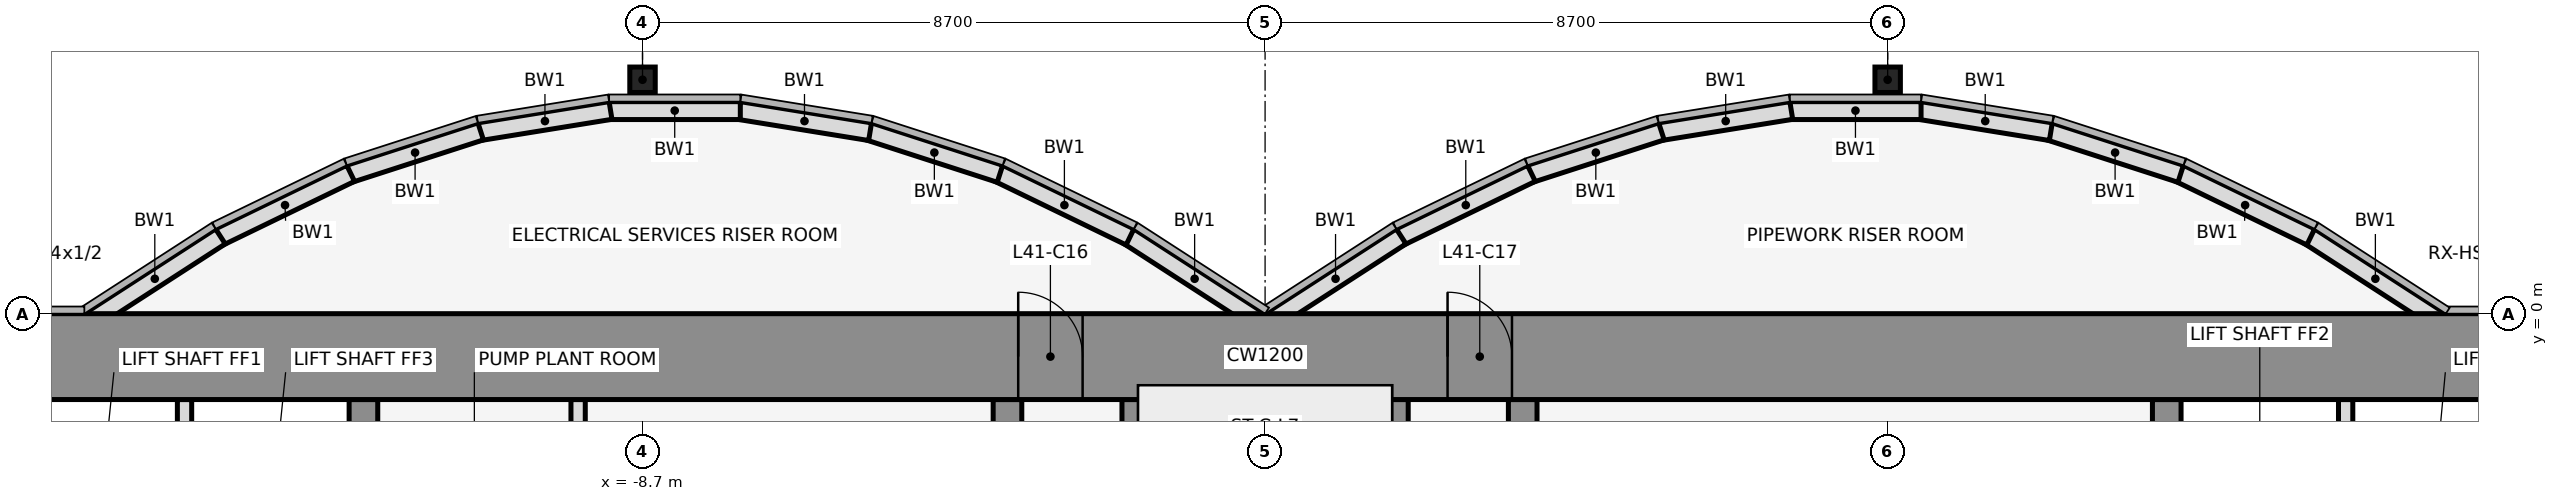
"""IFC4 building model, lengths in metres.
Left out: names, types, materials, properties, quantities, classifications, styles, units other than length and angle.
Written with IfcOpenShell. Run it as: python <this file> out.ifc"""

import sys

from ifc_helpers import new_model, si_unit, direction, frame, frame_2d, origin, origin_2d, place, context, subcontext, project, spatial, rectangle, hollow_rectangle, extrude, element, fill, save


model = new_model("IFC4")
c1 = context("Model", 3, precision=1e-05, world=origin(), true_north=direction((0.0, 1.0)))
c2 = subcontext(c1, "Body", "Model", "MODEL_VIEW")
j1 = project(units=[si_unit("LENGTHUNIT", "METRE"), si_unit("PLANEANGLEUNIT", "RADIAN")], contexts=[c1])
p1 = place(None, origin())
s1 = spatial("IfcSite", under=j1, at=p1, CompositionType="ELEMENT")
p2 = place(p1, origin())
s2 = spatial("IfcBuilding", under=s1, at=p2, CompositionType="ELEMENT")
p3 = place(p2, frame((0.0, 0.0, 185.5)))
s3 = spatial("IfcBuildingStorey", under=s2, at=p3, CompositionType="ELEMENT", Elevation=185.5)
for number, where, z_axis, x_axis in (
    (1, (-8.7, 3.269, 0.0), (0.0, 0.0, 1.0), (1.0, 0.0, 0.0)),
    (2, (8.7, 3.269, 0.0), (0.0, 0.0, 1.0), (1.0, 0.0, 0.0)),
):
    element("IfcColumn", number, at=place(p3, frame(where, z_axis=z_axis, x_axis=x_axis)), inside=s3, PredefinedType="COLUMN", context=c2, shape_type="SweptSolid", body=[
        extrude(hollow_rectangle(XDim=0.356, YDim=0.356, WallThickness=0.012, at=origin_2d()), origin(), (0.0, 0.0, 1.0), 5.4),
    ])
p4 = place(p3, frame((16.432, -0.105, 0.0), z_axis=(0.0, 0.0, 1.0), x_axis=(-0.83981312244, 0.542875602121, 0.0)))
e3 = element("IfcWall", 3, at=p4, inside=s3, PredefinedType="STANDARD", context=c2, shape_type="SweptSolid", body=[
    extrude(rectangle(XDim=2.183, YDim=0.25, at=frame_2d((1.091, 0.0))), origin(), (0.0, 0.0, 1.0), 5.25),
])
p5 = place(p3, frame((14.612, 1.073, 0.0), z_axis=(0.0, 0.0, 1.0), x_axis=(-0.89982408427, 0.436252928206, 0.0)))
e4 = element("IfcWall", 4, at=p5, inside=s3, PredefinedType="STANDARD", context=c2, shape_type="SweptSolid", body=[
    extrude(rectangle(XDim=2.038, YDim=0.25, at=frame_2d((1.019, 0.0))), origin(), (0.0, 0.0, 1.0), 5.25),
])
p6 = place(p3, frame((12.795, 1.955, 0.0), z_axis=(0.0, 0.0, 1.0), x_axis=(-0.951495806175, 0.307661714928, 0.0)))
e5 = element("IfcWall", 5, at=p6, inside=s3, PredefinedType="STANDARD", context=c2, shape_type="SweptSolid", body=[
    extrude(rectangle(XDim=1.927, YDim=0.25, at=frame_2d((0.963, 0.0))), origin(), (0.0, 0.0, 1.0), 5.25),
])
p7 = place(p3, frame((10.98, 2.543, 0.0), z_axis=(0.0, 0.0, 1.0), x_axis=(-0.987181718931, 0.159600293885, 0.0)))
e6 = element("IfcWall", 6, at=p7, inside=s3, PredefinedType="STANDARD", context=c2, shape_type="SweptSolid", body=[
    extrude(rectangle(XDim=1.857, YDim=0.25, at=frame_2d((0.929, 0.0))), origin(), (0.0, 0.0, 1.0), 5.25),
])
p8 = place(p3, frame((9.167, 2.838, 0.0), z_axis=(0.0, 0.0, 1.0), x_axis=(-1.0, 0.0, 0.0)))
e7 = element("IfcWall", 7, at=p8, inside=s3, PredefinedType="STANDARD", context=c2, shape_type="SweptSolid", body=[
    extrude(rectangle(XDim=1.833, YDim=0.25, at=frame_2d((0.917, 0.0))), origin(), (0.0, 0.0, 1.0), 5.25),
])
p9 = place(p3, frame((7.353, 2.84, 0.0), z_axis=(0.0, 0.0, 1.0), x_axis=(-0.987181718931, -0.159600293885, 0.0)))
e8 = element("IfcWall", 8, at=p9, inside=s3, PredefinedType="STANDARD", context=c2, shape_type="SweptSolid", body=[
    extrude(rectangle(XDim=1.857, YDim=0.25, at=frame_2d((0.929, 0.0))), origin(), (0.0, 0.0, 1.0), 5.25),
])
p10 = place(p3, frame((5.538, 2.548, 0.0), z_axis=(0.0, 0.0, 1.0), x_axis=(-0.951495806175, -0.307661714928, 0.0)))
e9 = element("IfcWall", 9, at=p10, inside=s3, PredefinedType="STANDARD", context=c2, shape_type="SweptSolid", body=[
    extrude(rectangle(XDim=1.927, YDim=0.25, at=frame_2d((0.963, 0.0))), origin(), (0.0, 0.0, 1.0), 5.25),
])
p11 = place(p3, frame((3.721, 1.962, 0.0), z_axis=(0.0, 0.0, 1.0), x_axis=(-0.89982408427, -0.436252928206, 0.0)))
e10 = element("IfcWall", 10, at=p11, inside=s3, PredefinedType="STANDARD", context=c2, shape_type="SweptSolid", body=[
    extrude(rectangle(XDim=2.038, YDim=0.25, at=frame_2d((1.019, 0.0))), origin(), (0.0, 0.0, 1.0), 5.25),
])
for number, where, z_axis, x_axis in (
    (11, (1.901, 1.08, 0.0), (0.0, 0.0, 1.0), (-0.84, -0.543, 0.0)),
    (12, (-0.068, -0.105, 0.0), (0.0, 0.0, 1.0), (-0.84, 0.543, 0.0)),
):
    element("IfcWall", number, at=place(p3, frame(where, z_axis=z_axis, x_axis=x_axis)), inside=s3, PredefinedType="STANDARD", context=c2, shape_type="SweptSolid", body=[
        extrude(rectangle(XDim=2.183, YDim=0.25, at=frame_2d((1.091, 0.0))), origin(), (0.0, 0.0, 1.0), 5.25),
    ])
p12 = place(p3, frame((-1.888, 1.073, 0.0), z_axis=(0.0, 0.0, 1.0), x_axis=(-0.89982408427, 0.436252928206, 0.0)))
e13 = element("IfcWall", 13, at=p12, inside=s3, PredefinedType="STANDARD", context=c2, shape_type="SweptSolid", body=[
    extrude(rectangle(XDim=2.038, YDim=0.25, at=frame_2d((1.019, 0.0))), origin(), (0.0, 0.0, 1.0), 5.25),
])
p13 = place(p3, frame((-3.705, 1.955, 0.0), z_axis=(0.0, 0.0, 1.0), x_axis=(-0.951495806175, 0.307661714928, 0.0)))
e14 = element("IfcWall", 14, at=p13, inside=s3, PredefinedType="STANDARD", context=c2, shape_type="SweptSolid", body=[
    extrude(rectangle(XDim=1.927, YDim=0.25, at=frame_2d((0.963, 0.0))), origin(), (0.0, 0.0, 1.0), 5.25),
])
p14 = place(p3, frame((-5.52, 2.543, 0.0), z_axis=(0.0, 0.0, 1.0), x_axis=(-0.987181718931, 0.159600293885, 0.0)))
e15 = element("IfcWall", 15, at=p14, inside=s3, PredefinedType="STANDARD", context=c2, shape_type="SweptSolid", body=[
    extrude(rectangle(XDim=1.857, YDim=0.25, at=frame_2d((0.929, 0.0))), origin(), (0.0, 0.0, 1.0), 5.25),
])
p15 = place(p3, frame((-7.333, 2.838, 0.0), z_axis=(0.0, 0.0, 1.0), x_axis=(-1.0, 0.0, 0.0)))
e16 = element("IfcWall", 16, at=p15, inside=s3, PredefinedType="STANDARD", context=c2, shape_type="SweptSolid", body=[
    extrude(rectangle(XDim=1.833, YDim=0.25, at=frame_2d((0.917, 0.0))), origin(), (0.0, 0.0, 1.0), 5.25),
])
p16 = place(p3, frame((-9.147, 2.84, 0.0), z_axis=(0.0, 0.0, 1.0), x_axis=(-0.987181718931, -0.159600293885, 0.0)))
e17 = element("IfcWall", 17, at=p16, inside=s3, PredefinedType="STANDARD", context=c2, shape_type="SweptSolid", body=[
    extrude(rectangle(XDim=1.857, YDim=0.25, at=frame_2d((0.929, 0.0))), origin(), (0.0, 0.0, 1.0), 5.25),
])
p17 = place(p3, frame((-10.962, 2.548, 0.0), z_axis=(0.0, 0.0, 1.0), x_axis=(-0.951495806175, -0.307661714928, 0.0)))
e18 = element("IfcWall", 18, at=p17, inside=s3, PredefinedType="STANDARD", context=c2, shape_type="SweptSolid", body=[
    extrude(rectangle(XDim=1.927, YDim=0.25, at=frame_2d((0.963, 0.0))), origin(), (0.0, 0.0, 1.0), 5.25),
])
p18 = place(p3, frame((-12.779, 1.962, 0.0), z_axis=(0.0, 0.0, 1.0), x_axis=(-0.89982408427, -0.436252928206, 0.0)))
e19 = element("IfcWall", 19, at=p18, inside=s3, PredefinedType="STANDARD", context=c2, shape_type="SweptSolid", body=[
    extrude(rectangle(XDim=2.038, YDim=0.25, at=frame_2d((1.019, 0.0))), origin(), (0.0, 0.0, 1.0), 5.25),
])
p19 = place(p3, frame((-14.599, 1.08, 0.0), z_axis=(0.0, 0.0, 1.0), x_axis=(-0.83981312244, -0.542875602121, 0.0)))
e20 = element("IfcWall", 20, at=p19, inside=s3, PredefinedType="STANDARD", context=c2, shape_type="SweptSolid", body=[
    extrude(rectangle(XDim=2.183, YDim=0.25, at=frame_2d((1.091, 0.0))), origin(), (0.0, 0.0, 1.0), 5.25),
])
p20 = place(p3, frame((-15.1, -4.6, 0.0), z_axis=(0.0, 0.0, 1.0), x_axis=(0.0, 1.0, 0.0)))
e21 = element("IfcWall", 21, at=p20, inside=s3, PredefinedType="PARTITIONING", context=c2, shape_type="SweptSolid", body=[
    extrude(rectangle(XDim=3.4, YDim=0.2, at=frame_2d((1.7, 0.0))), origin(), (0.0, 0.0, 1.0), 4.26),
])
p21 = place(p3, frame((-12.6, -11.8, 0.0), z_axis=(0.0, 0.0, 1.0), x_axis=(0.0, 1.0, 0.0)))
e22 = element("IfcWall", 22, at=p21, inside=s3, PredefinedType="SHEAR", context=c2, shape_type="SweptSolid", body=[
    extrude(rectangle(XDim=10.6, YDim=0.4, at=frame_2d((5.3, 0.0))), origin(), (0.0, 0.0, 1.0), 5.4),
])
p22 = place(p21, frame((4.75, 0.0, 0.0)))
e23 = element("IfcOpeningElement", 23, at=p22, cuts=e22, PredefinedType="OPENING", context=c2, shape_type="SweptSolid", body=[
    extrude(rectangle(XDim=1.1, YDim=2.1, at=frame_2d((0.55, 1.05))), frame((0.0, 0.212, 0.0), z_axis=(0.0, -1.0, 0.0), x_axis=(1.0, 0.0, 0.0)), (0.0, 0.0, 1.0), 0.424),
])
p23 = place(p3, frame((-9.6, -4.6, 0.0), z_axis=(0.0, 0.0, 1.0), x_axis=(0.0, 1.0, 0.0)))
e24 = element("IfcWall", 24, at=p23, inside=s3, PredefinedType="PARTITIONING", context=c2, shape_type="SweptSolid", body=[
    extrude(rectangle(XDim=3.4, YDim=0.2, at=frame_2d((1.7, 0.0))), origin(), (0.0, 0.0, 1.0), 4.26),
])
p24 = place(p3, frame((-3.6, -11.8, 0.0), z_axis=(0.0, 0.0, 1.0), x_axis=(0.0, 1.0, 0.0)))
e25 = element("IfcWall", 25, at=p24, inside=s3, PredefinedType="SHEAR", context=c2, shape_type="SweptSolid", body=[
    extrude(rectangle(XDim=10.6, YDim=0.4, at=frame_2d((5.3, 0.0))), origin(), (0.0, 0.0, 1.0), 5.4),
])
p25 = place(p24, frame((4.85, 0.0, 0.0)))
e26 = element("IfcOpeningElement", 26, at=p25, cuts=e25, PredefinedType="OPENING", context=c2, shape_type="SweptSolid", body=[
    extrude(rectangle(XDim=0.9, YDim=2.1, at=frame_2d((0.45, 1.05))), frame((0.0, 0.212, 0.0), z_axis=(0.0, -1.0, 0.0), x_axis=(1.0, 0.0, 0.0)), (0.0, 0.0, 1.0), 0.424),
])
for number, where, z_axis, x_axis in (
    (27, (-1.8, -11.8, 0.0), (0.0, 0.0, 1.0), (0.0, 1.0, 0.0)),
    (28, (1.8, -11.8, 0.0), (0.0, 0.0, 1.0), (0.0, 1.0, 0.0)),
):
    element("IfcWall", number, at=place(p3, frame(where, z_axis=z_axis, x_axis=x_axis)), inside=s3, PredefinedType="SHEAR", context=c2, shape_type="SweptSolid", body=[
        extrude(rectangle(XDim=10.6, YDim=0.4, at=frame_2d((5.3, 0.0))), origin(), (0.0, 0.0, 1.0), 5.4),
    ])
p26 = place(p3, frame((3.6, -11.8, 0.0), z_axis=(0.0, 0.0, 1.0), x_axis=(0.0, 1.0, 0.0)))
e29 = element("IfcWall", 29, at=p26, inside=s3, PredefinedType="SHEAR", context=c2, shape_type="SweptSolid", body=[
    extrude(rectangle(XDim=10.6, YDim=0.4, at=frame_2d((5.3, 0.0))), origin(), (0.0, 0.0, 1.0), 5.4),
])
p27 = place(p26, frame((1.35, 0.0, 0.0)))
e30 = element("IfcOpeningElement", 30, at=p27, cuts=e29, PredefinedType="OPENING", context=c2, shape_type="SweptSolid", body=[
    extrude(rectangle(XDim=0.9, YDim=2.1, at=frame_2d((0.45, 1.05))), frame((0.0, 0.212, 0.0), z_axis=(0.0, -1.0, 0.0), x_axis=(1.0, 0.0, 0.0)), (0.0, 0.0, 1.0), 0.424),
])
p28 = place(p3, frame((12.6, -11.8, 0.0), z_axis=(0.0, 0.0, 1.0), x_axis=(0.0, 1.0, 0.0)))
e31 = element("IfcWall", 31, at=p28, inside=s3, PredefinedType="SHEAR", context=c2, shape_type="SweptSolid", body=[
    extrude(rectangle(XDim=10.6, YDim=0.4, at=frame_2d((5.3, 0.0))), origin(), (0.0, 0.0, 1.0), 5.4),
])
p29 = place(p28, frame((1.25, 0.0, 0.0)))
e32 = element("IfcOpeningElement", 32, at=p29, cuts=e31, PredefinedType="OPENING", context=c2, shape_type="SweptSolid", body=[
    extrude(rectangle(XDim=1.2, YDim=2.1, at=frame_2d((0.6, 1.05))), frame((0.0, 0.212, 0.0), z_axis=(0.0, -1.0, 0.0), x_axis=(1.0, 0.0, 0.0)), (0.0, 0.0, 1.0), 0.424),
])
p30 = place(p28, frame((4.75, 0.0, 0.0)))
e33 = element("IfcOpeningElement", 33, at=p30, cuts=e31, PredefinedType="OPENING", context=c2, shape_type="SweptSolid", body=[
    extrude(rectangle(XDim=1.1, YDim=2.1, at=frame_2d((0.55, 1.05))), frame((0.0, 0.212, 0.0), z_axis=(0.0, -1.0, 0.0), x_axis=(1.0, 0.0, 0.0)), (0.0, 0.0, 1.0), 0.424),
])
p31 = place(p3, frame((15.1, -4.6, 0.0), z_axis=(0.0, 0.0, 1.0), x_axis=(0.0, 1.0, 0.0)))
e34 = element("IfcWall", 34, at=p31, inside=s3, PredefinedType="PARTITIONING", context=c2, shape_type="SweptSolid", body=[
    extrude(rectangle(XDim=3.4, YDim=0.2, at=frame_2d((1.7, 0.0))), origin(), (0.0, 0.0, 1.0), 4.26),
])
p32 = place(p3, frame((-22.0, -0.6, 0.0), z_axis=(0.0, 0.0, 1.0), x_axis=(1.0, 0.0, 0.0)))
e35 = element("IfcWall", 35, at=p32, inside=s3, PredefinedType="SHEAR", context=c2, shape_type="SweptSolid", body=[
    extrude(rectangle(XDim=44.0, YDim=1.2, at=frame_2d((22.0, 0.0))), origin(), (0.0, 0.0, 1.0), 5.4),
])
p33 = place(p32, frame((18.55, 0.0, 0.0)))
e36 = element("IfcOpeningElement", 36, at=p33, cuts=e35, PredefinedType="OPENING", context=c2, shape_type="SweptSolid", body=[
    extrude(rectangle(XDim=0.9, YDim=2.1, at=frame_2d((0.45, 1.05))), frame((0.0, 0.612, 0.0), z_axis=(0.0, -1.0, 0.0), x_axis=(1.0, 0.0, 0.0)), (0.0, 0.0, 1.0), 1.224),
])
p34 = place(p32, frame((24.55, 0.0, 0.0)))
e37 = element("IfcOpeningElement", 37, at=p34, cuts=e35, PredefinedType="OPENING", context=c2, shape_type="SweptSolid", body=[
    extrude(rectangle(XDim=0.9, YDim=2.1, at=frame_2d((0.45, 1.05))), frame((0.0, 0.612, 0.0), z_axis=(0.0, -1.0, 0.0), x_axis=(1.0, 0.0, 0.0)), (0.0, 0.0, 1.0), 1.224),
])
p35 = place(p33, origin())
e38 = element("IfcDoor", 38, at=p35, inside=s3, OperationType="SINGLE_SWING_LEFT", PredefinedType="DOOR", context=c2, shape_type="SweptSolid", body=[
    extrude(rectangle(XDim=0.9, YDim=2.1, at=frame_2d((0.45, 1.05))), frame((0.0, 0.025, 0.0), z_axis=(0.0, -1.0, 0.0), x_axis=(1.0, 0.0, 0.0)), (0.0, 0.0, 1.0), 0.05),
])
fill(e36, e38)
p36 = place(p34, origin())
e39 = element("IfcDoor", 39, at=p36, inside=s3, OperationType="SINGLE_SWING_LEFT", PredefinedType="DOOR", context=c2, shape_type="SweptSolid", body=[
    extrude(rectangle(XDim=0.9, YDim=2.1, at=frame_2d((0.45, 1.05))), frame((0.0, 0.025, 0.0), z_axis=(0.0, -1.0, 0.0), x_axis=(1.0, 0.0, 0.0)), (0.0, 0.0, 1.0), 0.05),
])
fill(e37, e39)
save(model, sys.argv[1])
